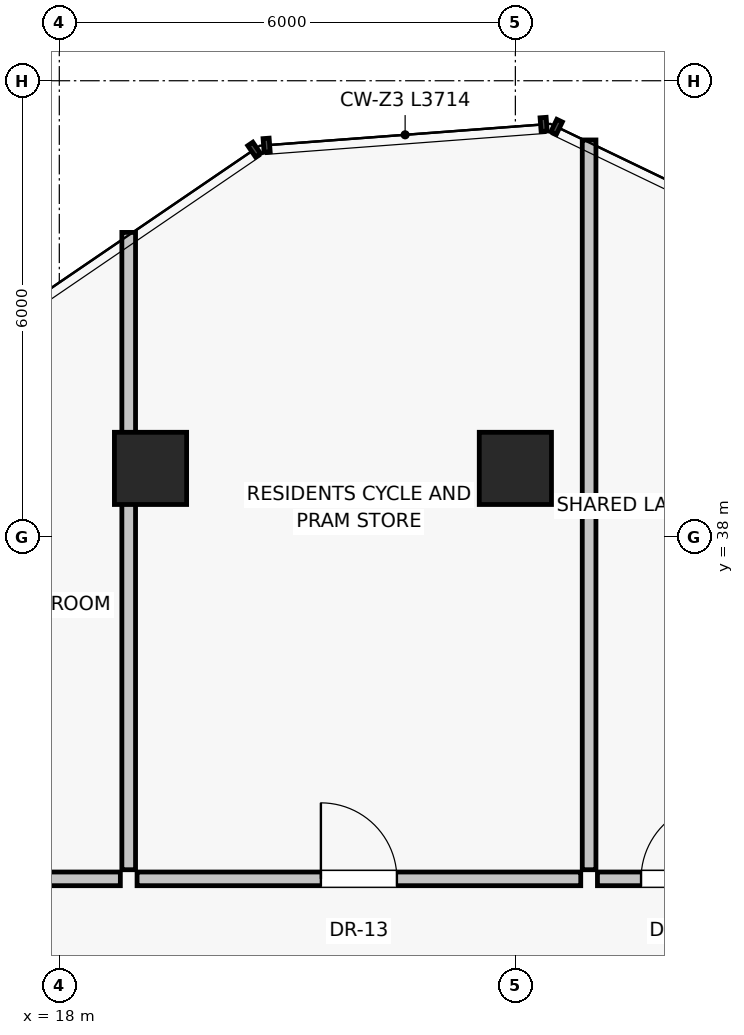
"""IFC4 building model, lengths in metres.
Left out: names, types, materials, properties, quantities, classifications, styles, units other than length and angle.
Written with IfcOpenShell. Run it as: python <this file> out.ifc"""

import sys

from ifc_helpers import new_model, si_unit, direction, frame, frame_2d, origin, origin_2d, place, context, subcontext, project, spatial, rectangle, extrude, source, transform, mapped, element, fill, save


model = new_model("IFC4")
c1 = context("Model", 3, precision=1e-05, world=origin(), true_north=direction((0.0, 1.0)))
c2 = subcontext(c1, "Body", "Model", "MODEL_VIEW")
j1 = project(units=[si_unit("LENGTHUNIT", "METRE"), si_unit("PLANEANGLEUNIT", "RADIAN")], contexts=[c1])
p1 = place(None, origin())
s1 = spatial("IfcSite", under=j1, at=p1, CompositionType="ELEMENT")
p2 = place(p1, origin())
s2 = spatial("IfcBuilding", under=s1, at=p2, CompositionType="ELEMENT")
p3 = place(p2, frame((0.0, 0.0, 191.85)))
s3 = spatial("IfcBuildingStorey", under=s2, at=p3, CompositionType="ELEMENT", Elevation=191.85)
for number, where, z_axis, x_axis in (
    (1, (24.0, 38.9, 0.0), (0.0, 0.0, 1.0), (1.0, 0.0, 0.0)),
    (2, (19.2, 38.9, 0.0), (0.0, 0.0, 1.0), (1.0, 0.0, 0.0)),
):
    element("IfcColumn", number, at=place(p3, frame(where, z_axis=z_axis, x_axis=x_axis)), inside=s3, PredefinedType="COLUMN", context=c2, shape_type="SweptSolid", body=[
        extrude(rectangle(XDim=0.95, YDim=0.95, at=origin_2d()), origin(), (0.0, 0.0, 1.0), 3.25),
    ])
p4 = place(p3, frame((15.31, 33.5, 0.0), z_axis=(0.0, 0.0, 1.0), x_axis=(1.0, 0.0, 0.0)))
e3 = element("IfcWall", 3, at=p4, inside=s3, PredefinedType="PARTITIONING", context=c2, shape_type="SweptSolid", body=[
    extrude(rectangle(XDim=3.493, YDim=0.18, at=frame_2d((1.747, 0.0))), origin(), (0.0, 0.0, 1.0), 3.015),
])
p5 = place(p4, frame((1.247, 0.0, 0.0)))
e4 = element("IfcOpeningElement", 4, at=p5, cuts=e3, PredefinedType="OPENING", context=c2, shape_type="SweptSolid", body=[
    extrude(rectangle(XDim=1.0, YDim=2.01, at=frame_2d((0.5, 1.005))), frame((0.0, 0.1, 0.0), z_axis=(0.0, -1.0, 0.0), x_axis=(1.0, 0.0, 0.0)), (0.0, 0.0, 1.0), 0.2),
])
p6 = place(p3, frame((19.023, 33.5, 0.0), z_axis=(0.0, 0.0, 1.0), x_axis=(1.0, 0.0, 0.0)))
e5 = element("IfcWall", 5, at=p6, inside=s3, PredefinedType="PARTITIONING", context=c2, shape_type="SweptSolid", body=[
    extrude(rectangle(XDim=5.837, YDim=0.18, at=frame_2d((2.918, 0.0))), origin(), (0.0, 0.0, 1.0), 3.015),
])
p7 = place(p6, frame((2.418, 0.0, 0.0)))
e6 = element("IfcOpeningElement", 6, at=p7, cuts=e5, PredefinedType="OPENING", context=c2, shape_type="SweptSolid", body=[
    extrude(rectangle(XDim=1.0, YDim=2.01, at=frame_2d((0.5, 1.005))), frame((0.0, 0.1, 0.0), z_axis=(0.0, -1.0, 0.0), x_axis=(1.0, 0.0, 0.0)), (0.0, 0.0, 1.0), 0.2),
])
p8 = place(p3, frame((18.913, 33.62, 0.0), z_axis=(0.0, 0.0, 1.0), x_axis=(0.0, 1.0, 0.0)))
e7 = element("IfcWall", 7, at=p8, inside=s3, PredefinedType="PARTITIONING", context=c2, shape_type="SweptSolid", body=[
    extrude(rectangle(XDim=8.385, YDim=0.18, at=frame_2d((4.192, 0.0))), origin(), (0.0, 0.0, 1.0), 2.469),
])
p9 = place(p3, frame((24.97, 33.62, 0.0), z_axis=(0.0, 0.0, 1.0), x_axis=(0.0, 1.0, 0.0)))
e8 = element("IfcWall", 8, at=p9, inside=s3, PredefinedType="PARTITIONING", context=c2, shape_type="SweptSolid", body=[
    extrude(rectangle(XDim=9.601, YDim=0.18, at=frame_2d((4.8, 0.0))), origin(), (0.0, 0.0, 1.0), 3.015),
])
p10 = place(p3, frame((25.08, 33.5, 0.0), z_axis=(0.0, 0.0, 1.0), x_axis=(1.0, 0.0, 0.0)))
e9 = element("IfcWall", 9, at=p10, inside=s3, PredefinedType="PARTITIONING", context=c2, shape_type="SweptSolid", body=[
    extrude(rectangle(XDim=2.147, YDim=0.18, at=frame_2d((1.073, 0.0))), origin(), (0.0, 0.0, 1.0), 3.015),
])
p11 = place(p10, frame((0.573, 0.0, 0.0)))
e10 = element("IfcOpeningElement", 10, at=p11, cuts=e9, PredefinedType="OPENING", context=c2, shape_type="SweptSolid", body=[
    extrude(rectangle(XDim=1.0, YDim=2.01, at=frame_2d((0.5, 1.005))), frame((0.0, 0.1, 0.0), z_axis=(0.0, -1.0, 0.0), x_axis=(1.0, 0.0, 0.0)), (0.0, 0.0, 1.0), 0.2),
])
m1 = source(origin(), c2, "Body", "SweptSolid", [
    extrude(rectangle(XDim=1.0, YDim=2.01, at=frame_2d((0.5, 1.005))), frame((0.0, 0.025, 0.0), z_axis=(0.0, -1.0, 0.0), x_axis=(1.0, 0.0, 0.0)), (0.0, 0.0, 1.0), 0.05),
])
p12 = place(p7, origin())
e11 = element("IfcDoor", 11, at=p12, inside=s3, OperationType="SINGLE_SWING_LEFT", PredefinedType="DOOR", context=c2, shape_type="MappedRepresentation", body=[
    mapped(m1, transform((0.0, 0.0, 0.0), scale=1.0)),
])
fill(e6, e11)
p13 = place(p11, origin())
e12 = element("IfcDoor", 12, at=p13, inside=s3, OperationType="SINGLE_SWING_RIGHT", PredefinedType="DOOR", context=c2, shape_type="MappedRepresentation", body=[
    mapped(m1, transform((0.0, 0.0, 0.0), scale=1.0)),
])
fill(e10, e12)
save(model, sys.argv[1])
